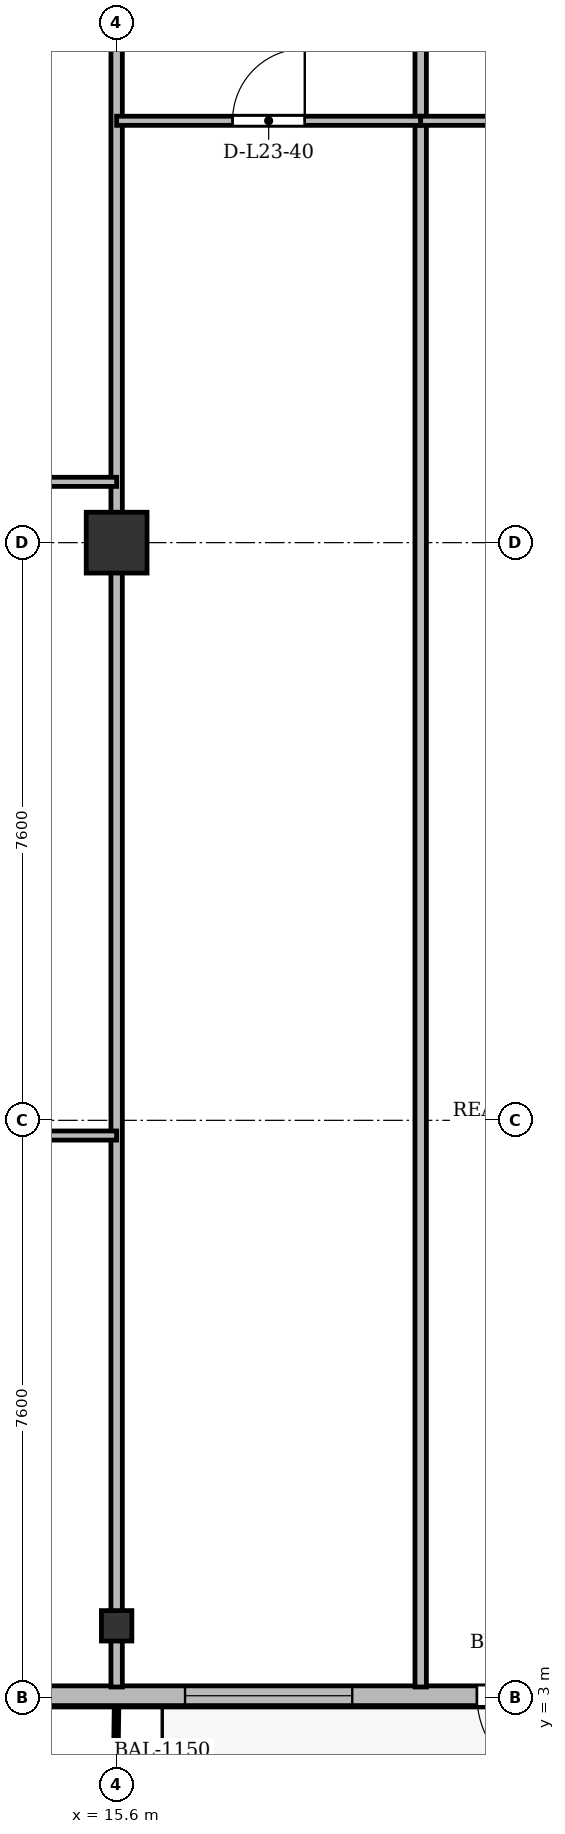
"""IFC4 building model, lengths in metres.
Left out: names, types, materials, properties, quantities, classifications, styles, units other than length and angle.
Written with IfcOpenShell. Run it as: python <this file> out.ifc"""

import sys

from ifc_helpers import new_model, si_unit, direction, frame, frame_2d, origin, origin_2d, place, context, subcontext, project, spatial, rectangle, i_section, extrude, source, transform, mapped, element, fill, save


model = new_model("IFC4")
c1 = context("Model", 3, precision=1e-05, world=origin(), true_north=direction((0.0, 1.0)))
c2 = subcontext(c1, "Body", "Model", "MODEL_VIEW")
j1 = project(units=[si_unit("LENGTHUNIT", "METRE"), si_unit("PLANEANGLEUNIT", "RADIAN")], contexts=[c1])
p1 = place(None, origin())
s1 = spatial("IfcSite", under=j1, at=p1, CompositionType="ELEMENT")
p2 = place(p1, origin())
s2 = spatial("IfcBuilding", under=s1, at=p2, CompositionType="ELEMENT")
p3 = place(p2, frame((0.0, 0.0, 92.5)))
s3 = spatial("IfcBuildingStorey", under=s2, at=p3, CompositionType="ELEMENT", Elevation=92.5)
m1 = source(origin(), c2, "Body", "SweptSolid", [
    extrude(i_section(OverallWidth=0.4, OverallDepth=0.4, WebThickness=0.022, FlangeThickness=0.035, at=origin_2d()), origin(), (0.0, 0.0, 1.0), 3.6),
])
p4 = place(p3, frame((15.6, 3.95, 0.0), z_axis=(0.0, 0.0, 1.0), x_axis=(1.0, 0.0, 0.0)))
e1 = element("IfcColumn", 1, at=p4, inside=s3, PredefinedType="COLUMN", context=c2, shape_type="MappedRepresentation", body=[
    mapped(m1, transform((0.0, 0.0, 0.0), x_axis=(1.0, 0.0, 0.0), y_axis=(0.0, 1.0, 0.0), z_axis=(0.0, 0.0, 1.0), scale=1.0)),
])
m2 = source(origin(), c2, "Body", "SweptSolid", [
    extrude(rectangle(XDim=0.8, YDim=0.8, at=origin_2d()), origin(), (0.0, 0.0, 1.0), 3.6),
])
p5 = place(p3, frame((15.6, 18.2, 0.0), z_axis=(0.0, 0.0, 1.0), x_axis=(1.0, 0.0, 0.0)))
e2 = element("IfcColumn", 2, at=p5, inside=s3, PredefinedType="COLUMN", context=c2, shape_type="MappedRepresentation", body=[
    mapped(m2, transform((0.0, 0.0, 0.0), x_axis=(1.0, 0.0, 0.0), y_axis=(0.0, 1.0, 0.0), z_axis=(0.0, 0.0, 1.0), scale=1.0)),
])
p6 = place(p3, frame((66.9, 3.03, 0.0), z_axis=(0.0, 0.0, 1.0), x_axis=(-1.0, 0.0, 0.0)))
e3 = element("IfcWall", 3, at=p6, inside=s3, PredefinedType="SOLIDWALL", context=c2, shape_type="SweptSolid", body=[
    extrude(rectangle(XDim=59.4, YDim=0.26, at=frame_2d((29.7, 0.0))), origin(), (0.0, 0.0, 1.0), 3.34),
])
p7 = place(p6, frame((2.175, 0.0, 0.9)))
e4 = element("IfcOpeningElement", 4, at=p7, cuts=e3, PredefinedType="OPENING", context=c2, shape_type="SweptSolid", body=[
    extrude(rectangle(XDim=1.65, YDim=1.85, at=frame_2d((0.825, 0.925))), frame((0.0, 0.14, 0.0), z_axis=(0.0, -1.0, 0.0), x_axis=(1.0, 0.0, 0.0)), (0.0, 0.0, 1.0), 0.28),
])
p8 = place(p6, frame((5.5, 0.0, 0.9)))
e5 = element("IfcOpeningElement", 5, at=p8, cuts=e3, PredefinedType="OPENING", context=c2, shape_type="SweptSolid", body=[
    extrude(rectangle(XDim=1.8, YDim=1.8, at=frame_2d((0.9, 0.9))), frame((0.0, 0.14, 0.0), z_axis=(0.0, -1.0, 0.0), x_axis=(1.0, 0.0, 0.0)), (0.0, 0.0, 1.0), 0.28),
])
p9 = place(p6, frame((8.65, 0.0, 0.9)))
e6 = element("IfcOpeningElement", 6, at=p9, cuts=e3, PredefinedType="OPENING", context=c2, shape_type="SweptSolid", body=[
    extrude(rectangle(XDim=1.5, YDim=1.75, at=frame_2d((0.75, 0.875))), frame((0.0, 0.14, 0.0), z_axis=(0.0, -1.0, 0.0), x_axis=(1.0, 0.0, 0.0)), (0.0, 0.0, 1.0), 0.28),
])
p10 = place(p6, frame((11.25, 0.0, 0.9)))
e7 = element("IfcOpeningElement", 7, at=p10, cuts=e3, PredefinedType="OPENING", context=c2, shape_type="SweptSolid", body=[
    extrude(rectangle(XDim=1.5, YDim=1.75, at=frame_2d((0.75, 0.875))), frame((0.0, 0.14, 0.0), z_axis=(0.0, -1.0, 0.0), x_axis=(1.0, 0.0, 0.0)), (0.0, 0.0, 1.0), 0.28),
])
p11 = place(p6, frame((13.6, 0.0, 0.9)))
e8 = element("IfcOpeningElement", 8, at=p11, cuts=e3, PredefinedType="OPENING", context=c2, shape_type="SweptSolid", body=[
    extrude(rectangle(XDim=2.0, YDim=1.95, at=frame_2d((1.0, 0.975))), frame((0.0, 0.14, 0.0), z_axis=(0.0, -1.0, 0.0), x_axis=(1.0, 0.0, 0.0)), (0.0, 0.0, 1.0), 0.28),
])
p12 = place(p6, frame((16.775, 0.0, 0.9)))
e9 = element("IfcOpeningElement", 9, at=p12, cuts=e3, PredefinedType="OPENING", context=c2, shape_type="SweptSolid", body=[
    extrude(rectangle(XDim=1.65, YDim=1.85, at=frame_2d((0.825, 0.925))), frame((0.0, 0.14, 0.0), z_axis=(0.0, -1.0, 0.0), x_axis=(1.0, 0.0, 0.0)), (0.0, 0.0, 1.0), 0.28),
])
p13 = place(p6, frame((20.227, 0.0, 0.0)))
e10 = element("IfcOpeningElement", 10, at=p13, cuts=e3, PredefinedType="OPENING", context=c2, shape_type="SweptSolid", body=[
    extrude(rectangle(XDim=1.2, YDim=2.2, at=frame_2d((0.6, 1.1))), frame((0.0, 0.14, 0.0), z_axis=(0.0, -1.0, 0.0), x_axis=(1.0, 0.0, 0.0)), (0.0, 0.0, 1.0), 0.28),
])
p14 = place(p6, frame((28.6, 0.0, 0.9)))
e11 = element("IfcOpeningElement", 11, at=p14, cuts=e3, PredefinedType="OPENING", context=c2, shape_type="SweptSolid", body=[
    extrude(rectangle(XDim=2.2, YDim=1.8, at=frame_2d((1.1, 0.9))), frame((0.0, 0.14, 0.0), z_axis=(0.0, -1.0, 0.0), x_axis=(1.0, 0.0, 0.0)), (0.0, 0.0, 1.0), 0.28),
])
p15 = place(p6, frame((36.75, 0.0, 0.9)))
e12 = element("IfcOpeningElement", 12, at=p15, cuts=e3, PredefinedType="OPENING", context=c2, shape_type="SweptSolid", body=[
    extrude(rectangle(XDim=1.5, YDim=1.75, at=frame_2d((0.75, 0.875))), frame((0.0, 0.14, 0.0), z_axis=(0.0, -1.0, 0.0), x_axis=(1.0, 0.0, 0.0)), (0.0, 0.0, 1.0), 0.28),
])
p16 = place(p6, frame((39.15, 0.0, 0.9)))
e13 = element("IfcOpeningElement", 13, at=p16, cuts=e3, PredefinedType="OPENING", context=c2, shape_type="SweptSolid", body=[
    extrude(rectangle(XDim=1.5, YDim=1.75, at=frame_2d((0.75, 0.875))), frame((0.0, 0.14, 0.0), z_axis=(0.0, -1.0, 0.0), x_axis=(1.0, 0.0, 0.0)), (0.0, 0.0, 1.0), 0.28),
])
p17 = place(p6, frame((41.475, 0.0, 0.9)))
e14 = element("IfcOpeningElement", 14, at=p17, cuts=e3, PredefinedType="OPENING", context=c2, shape_type="SweptSolid", body=[
    extrude(rectangle(XDim=1.65, YDim=1.85, at=frame_2d((0.825, 0.925))), frame((0.0, 0.14, 0.0), z_axis=(0.0, -1.0, 0.0), x_axis=(1.0, 0.0, 0.0)), (0.0, 0.0, 1.0), 0.28),
])
p18 = place(p6, frame((45.36, 0.0, 0.0)))
e15 = element("IfcOpeningElement", 15, at=p18, cuts=e3, PredefinedType="OPENING", context=c2, shape_type="SweptSolid", body=[
    extrude(rectangle(XDim=1.2, YDim=2.2, at=frame_2d((0.6, 1.1))), frame((0.0, 0.14, 0.0), z_axis=(0.0, -1.0, 0.0), x_axis=(1.0, 0.0, 0.0)), (0.0, 0.0, 1.0), 0.28),
])
p19 = place(p6, frame((48.2, 0.0, 0.9)))
e16 = element("IfcOpeningElement", 16, at=p19, cuts=e3, PredefinedType="OPENING", context=c2, shape_type="SweptSolid", body=[
    extrude(rectangle(XDim=2.2, YDim=1.8, at=frame_2d((1.1, 0.9))), frame((0.0, 0.14, 0.0), z_axis=(0.0, -1.0, 0.0), x_axis=(1.0, 0.0, 0.0)), (0.0, 0.0, 1.0), 0.28),
])
p20 = place(p6, frame((52.25, 0.0, 0.9)))
e17 = element("IfcOpeningElement", 17, at=p20, cuts=e3, PredefinedType="OPENING", context=c2, shape_type="SweptSolid", body=[
    extrude(rectangle(XDim=1.5, YDim=1.75, at=frame_2d((0.75, 0.875))), frame((0.0, 0.14, 0.0), z_axis=(0.0, -1.0, 0.0), x_axis=(1.0, 0.0, 0.0)), (0.0, 0.0, 1.0), 0.28),
])
p21 = place(p6, frame((55.4, 0.0, 0.9)))
e18 = element("IfcOpeningElement", 18, at=p21, cuts=e3, PredefinedType="OPENING", context=c2, shape_type="SweptSolid", body=[
    extrude(rectangle(XDim=2.0, YDim=1.95, at=frame_2d((1.0, 0.975))), frame((0.0, 0.14, 0.0), z_axis=(0.0, -1.0, 0.0), x_axis=(1.0, 0.0, 0.0)), (0.0, 0.0, 1.0), 0.28),
])
p22 = place(p3, frame((15.6, 3.145, 0.0), z_axis=(0.0, 0.0, 1.0), x_axis=(0.0, 1.0, 0.0)))
e19 = element("IfcWall", 19, at=p22, inside=s3, PredefinedType="PARTITIONING", context=c2, shape_type="SweptSolid", body=[
    extrude(rectangle(XDim=24.455, YDim=0.15, at=frame_2d((12.228, 0.0))), origin(), (0.0, 0.0, 1.0), 2.84),
])
p23 = place(p3, frame((19.6, 3.145, 0.0), z_axis=(0.0, 0.0, 1.0), x_axis=(0.0, 1.0, 0.0)))
e20 = element("IfcWall", 20, at=p23, inside=s3, PredefinedType="PARTITIONING", context=c2, shape_type="SweptSolid", body=[
    extrude(rectangle(XDim=24.455, YDim=0.15, at=frame_2d((12.228, 0.0))), origin(), (0.0, 0.0, 1.0), 2.752),
])
p24 = place(p3, frame((8.8, 19.0, 0.0), z_axis=(0.0, 0.0, 1.0), x_axis=(1.0, 0.0, 0.0)))
e21 = element("IfcWall", 21, at=p24, inside=s3, PredefinedType="PARTITIONING", context=c2, shape_type="SweptSolid", body=[
    extrude(rectangle(XDim=6.8, YDim=0.12, at=frame_2d((3.4, 0.0))), origin(), (0.0, 0.0, 1.0), 2.84),
])
p25 = place(p24, frame((2.925, 0.0, 0.0)))
e22 = element("IfcOpeningElement", 22, at=p25, cuts=e21, PredefinedType="OPENING", context=c2, shape_type="SweptSolid", body=[
    extrude(rectangle(XDim=0.95, YDim=2.15, at=frame_2d((0.475, 1.075))), frame((0.0, 0.07, 0.0), z_axis=(0.0, -1.0, 0.0), x_axis=(1.0, 0.0, 0.0)), (0.0, 0.0, 1.0), 0.14),
])
p26 = place(p3, frame((12.2, 10.4, 0.0), z_axis=(0.0, 0.0, 1.0), x_axis=(1.0, 0.0, 0.0)))
e23 = element("IfcWall", 23, at=p26, inside=s3, PredefinedType="PARTITIONING", context=c2, shape_type="SweptSolid", body=[
    extrude(rectangle(XDim=3.4, YDim=0.12, at=frame_2d((1.7, 0.0))), origin(), (0.0, 0.0, 1.0), 2.84),
])
p27 = place(p26, frame((1.131, 0.0, 0.0)))
e24 = element("IfcOpeningElement", 24, at=p27, cuts=e23, PredefinedType="OPENING", context=c2, shape_type="SweptSolid", body=[
    extrude(rectangle(XDim=0.95, YDim=2.15, at=frame_2d((0.475, 1.075))), frame((0.0, 0.07, 0.0), z_axis=(0.0, -1.0, 0.0), x_axis=(1.0, 0.0, 0.0)), (0.0, 0.0, 1.0), 0.14),
])
p28 = place(p3, frame((15.6, 23.75, 0.0), z_axis=(0.0, 0.0, 1.0), x_axis=(1.0, 0.0, 0.0)))
e25 = element("IfcWall", 25, at=p28, inside=s3, PredefinedType="PARTITIONING", context=c2, shape_type="SweptSolid", body=[
    extrude(rectangle(XDim=4.0, YDim=0.12, at=frame_2d((2.0, 0.0))), origin(), (0.0, 0.0, 1.0), 2.84),
])
p29 = place(p28, frame((1.525, 0.0, 0.0)))
e26 = element("IfcOpeningElement", 26, at=p29, cuts=e25, PredefinedType="OPENING", context=c2, shape_type="SweptSolid", body=[
    extrude(rectangle(XDim=0.95, YDim=2.15, at=frame_2d((0.475, 1.075))), frame((0.0, 0.07, 0.0), z_axis=(0.0, -1.0, 0.0), x_axis=(1.0, 0.0, 0.0)), (0.0, 0.0, 1.0), 0.14),
])
p30 = place(p3, frame((19.6, 23.75, 0.0), z_axis=(0.0, 0.0, 1.0), x_axis=(1.0, 0.0, 0.0)))
e27 = element("IfcWall", 27, at=p30, inside=s3, PredefinedType="PARTITIONING", context=c2, shape_type="SweptSolid", body=[
    extrude(rectangle(XDim=3.8, YDim=0.12, at=frame_2d((1.9, 0.0))), origin(), (0.0, 0.0, 1.0), 2.84),
])
p31 = place(p30, frame((1.33, 0.0, 0.0)))
e28 = element("IfcOpeningElement", 28, at=p31, cuts=e27, PredefinedType="OPENING", context=c2, shape_type="SweptSolid", body=[
    extrude(rectangle(XDim=0.95, YDim=2.15, at=frame_2d((0.475, 1.075))), frame((0.0, 0.07, 0.0), z_axis=(0.0, -1.0, 0.0), x_axis=(1.0, 0.0, 0.0)), (0.0, 0.0, 1.0), 0.14),
])
m3 = source(origin(), c2, "Body", "SweptSolid", [
    extrude(rectangle(XDim=1.2, YDim=2.2, at=frame_2d((0.6, 1.1))), frame((0.0, 0.025, 0.0), z_axis=(0.0, -1.0, 0.0), x_axis=(1.0, 0.0, 0.0)), (0.0, 0.0, 1.0), 0.05),
])
p32 = place(p18, origin())
e29 = element("IfcDoor", 29, at=p32, inside=s3, OperationType="SINGLE_SWING_LEFT", PredefinedType="DOOR", context=c2, shape_type="MappedRepresentation", body=[
    mapped(m3, transform((0.0, 0.0, 0.0), x_axis=(1.0, 0.0, 0.0), y_axis=(0.0, 1.0, 0.0), z_axis=(0.0, 0.0, 1.0), scale=1.0)),
])
fill(e15, e29)
m4 = source(origin(), c2, "Body", "SweptSolid", [
    extrude(rectangle(XDim=2.2, YDim=1.8, at=frame_2d((1.1, 0.9))), frame((0.0, 0.03, 0.0), z_axis=(0.0, -1.0, 0.0), x_axis=(1.0, 0.0, 0.0)), (0.0, 0.0, 1.0), 0.06),
])
p33 = place(p19, origin())
e30 = element("IfcWindow", 30, at=p33, inside=s3, PartitioningType="SINGLE_PANEL", PredefinedType="WINDOW", context=c2, shape_type="MappedRepresentation", body=[
    mapped(m4, transform((0.0, 0.0, 0.0), x_axis=(1.0, 0.0, 0.0), y_axis=(0.0, 1.0, 0.0), z_axis=(0.0, 0.0, 1.0), scale=1.0)),
])
fill(e16, e30)
m5 = source(origin(), c2, "Body", "SweptSolid", [
    extrude(rectangle(XDim=0.95, YDim=2.15, at=frame_2d((0.475, 1.075))), frame((0.0, 0.025, 0.0), z_axis=(0.0, -1.0, 0.0), x_axis=(1.0, 0.0, 0.0)), (0.0, 0.0, 1.0), 0.05),
])
p34 = place(p29, origin())
e31 = element("IfcDoor", 31, at=p34, inside=s3, OperationType="SINGLE_SWING_RIGHT", PredefinedType="DOOR", context=c2, shape_type="MappedRepresentation", body=[
    mapped(m5, transform((0.0, 0.0, 0.0), x_axis=(1.0, 0.0, 0.0), y_axis=(0.0, 1.0, 0.0), z_axis=(0.0, 0.0, 1.0), scale=1.0)),
])
fill(e26, e31)
save(model, sys.argv[1])
